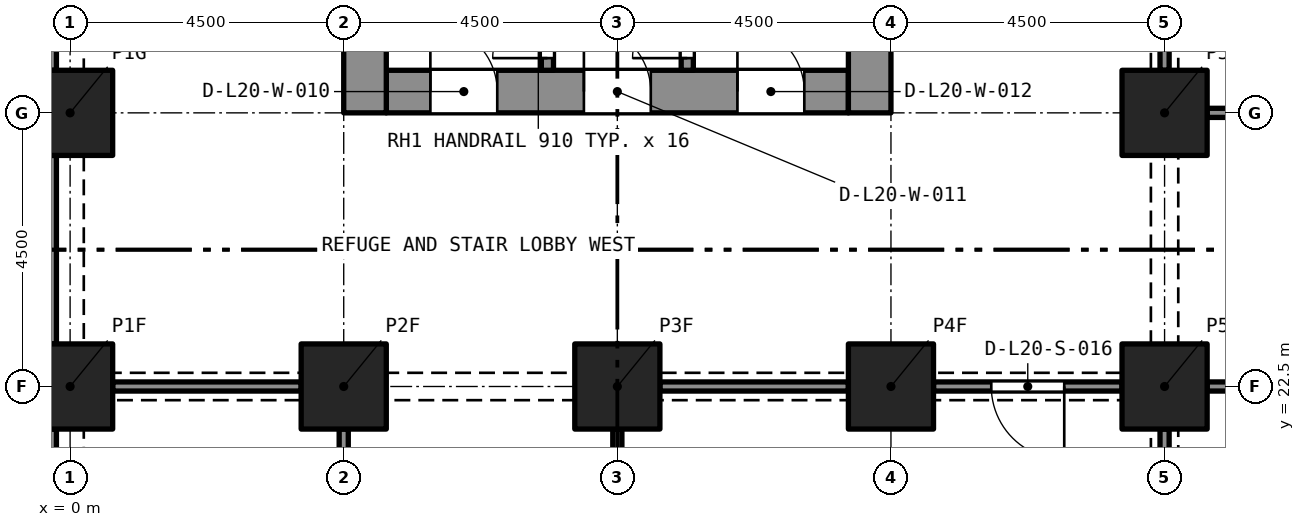
"""IFC4 building model, lengths in metres.
Left out: names, types, materials, properties, quantities, classifications, styles, units other than length and angle.
Written with IfcOpenShell. Run it as: python <this file> out.ifc"""

import sys

from ifc_helpers import new_model, si_unit, direction, frame, frame_2d, origin, origin_2d, place, context, subcontext, project, spatial, rectangle, extrude, element, fill, save


model = new_model("IFC4")
c1 = context("Model", 3, precision=1e-05, world=origin(), true_north=direction((0.0, 1.0)))
c2 = subcontext(c1, "Body", "Model", "MODEL_VIEW")
j1 = project(units=[si_unit("LENGTHUNIT", "METRE"), si_unit("PLANEANGLEUNIT", "RADIAN")], contexts=[c1])
p1 = place(None, origin())
s1 = spatial("IfcSite", under=j1, at=p1, CompositionType="ELEMENT")
p2 = place(p1, origin())
s2 = spatial("IfcBuilding", under=s1, at=p2, CompositionType="ELEMENT")
p3 = place(p2, frame((0.0, 0.0, 75.2)))
s3 = spatial("IfcBuildingStorey", under=s2, at=p3, CompositionType="ELEMENT", Elevation=75.2)
for number, where, z_axis, x_axis in (
    (1, (0.0, 22.5, 0.0), (0.0, 0.0, 1.0), (1.0, 0.0, 0.0)),
    (2, (4.5, 22.5, 0.0), (0.0, 0.0, 1.0), (1.0, 0.0, 0.0)),
    (3, (9.0, 22.5, 0.0), (0.0, 0.0, 1.0), (1.0, 0.0, 0.0)),
    (4, (13.5, 22.5, 0.0), (0.0, 0.0, 1.0), (1.0, 0.0, 0.0)),
    (5, (18.0, 22.5, 0.0), (0.0, 0.0, 1.0), (1.0, 0.0, 0.0)),
    (6, (0.0, 27.0, 0.0), (0.0, 0.0, 1.0), (1.0, 0.0, 0.0)),
    (7, (18.0, 27.0, 0.0), (0.0, 0.0, 1.0), (1.0, 0.0, 0.0)),
):
    element("IfcColumn", number, at=place(p3, frame(where, z_axis=z_axis, x_axis=x_axis)), inside=s3, PredefinedType="COLUMN", context=c2, shape_type="SweptSolid", body=[
        extrude(rectangle(XDim=1.4, YDim=1.4, at=origin_2d()), origin(), (0.0, 0.0, 1.0), 4.8),
    ])
p4 = place(p3, frame((5.2, 27.35, 0.0), z_axis=(0.0, 0.0, 1.0), x_axis=(1.0, 0.0, 0.0)))
e8 = element("IfcWall", 8, at=p4, inside=s3, PredefinedType="SOLIDWALL", context=c2, shape_type="SweptSolid", body=[
    extrude(rectangle(XDim=7.6, YDim=0.7, at=frame_2d((3.8, 0.0))), origin(), (0.0, 0.0, 1.0), 4.8),
])
p5 = place(p4, frame((0.725, 0.0, 0.0)))
e9 = element("IfcOpeningElement", 9, at=p5, cuts=e8, PredefinedType="OPENING", context=c2, shape_type="SweptSolid", body=[
    extrude(rectangle(XDim=1.1, YDim=2.1, at=frame_2d((0.55, 1.05))), frame((0.0, 0.36, 0.0), z_axis=(0.0, -1.0, 0.0), x_axis=(1.0, 0.0, 0.0)), (0.0, 0.0, 1.0), 0.72),
])
p6 = place(p4, frame((3.25, 0.0, 0.0)))
e10 = element("IfcOpeningElement", 10, at=p6, cuts=e8, PredefinedType="OPENING", context=c2, shape_type="SweptSolid", body=[
    extrude(rectangle(XDim=1.1, YDim=2.1, at=frame_2d((0.55, 1.05))), frame((0.0, 0.36, 0.0), z_axis=(0.0, -1.0, 0.0), x_axis=(1.0, 0.0, 0.0)), (0.0, 0.0, 1.0), 0.72),
])
p7 = place(p4, frame((5.775, 0.0, 0.0)))
e11 = element("IfcOpeningElement", 11, at=p7, cuts=e8, PredefinedType="OPENING", context=c2, shape_type="SweptSolid", body=[
    extrude(rectangle(XDim=1.1, YDim=2.1, at=frame_2d((0.55, 1.05))), frame((0.0, 0.36, 0.0), z_axis=(0.0, -1.0, 0.0), x_axis=(1.0, 0.0, 0.0)), (0.0, 0.0, 1.0), 0.72),
])
p8 = place(p3, frame((4.85, 27.0, 0.0), z_axis=(0.0, 0.0, 1.0), x_axis=(0.0, 1.0, 0.0)))
e12 = element("IfcWall", 12, at=p8, inside=s3, PredefinedType="SOLIDWALL", context=c2, shape_type="SweptSolid", body=[
    extrude(rectangle(XDim=13.5, YDim=0.7, at=frame_2d((6.75, 0.0))), origin(), (0.0, 0.0, 1.0), 4.8),
])
p9 = place(p8, frame((8.95, 0.0, 0.0)))
e13 = element("IfcOpeningElement", 13, at=p9, cuts=e12, PredefinedType="OPENING", context=c2, shape_type="SweptSolid", body=[
    extrude(rectangle(XDim=1.2, YDim=2.1, at=frame_2d((0.6, 1.05))), frame((0.0, 0.36, 0.0), z_axis=(0.0, -1.0, 0.0), x_axis=(1.0, 0.0, 0.0)), (0.0, 0.0, 1.0), 0.72),
])
p10 = place(p3, frame((13.15, 27.0, 0.0), z_axis=(0.0, 0.0, 1.0), x_axis=(0.0, 1.0, 0.0)))
e14 = element("IfcWall", 14, at=p10, inside=s3, PredefinedType="SOLIDWALL", context=c2, shape_type="SweptSolid", body=[
    extrude(rectangle(XDim=13.5, YDim=0.7, at=frame_2d((6.75, 0.0))), origin(), (0.0, 0.0, 1.0), 4.8),
])
p11 = place(p10, frame((11.1, 0.0, 0.0)))
e15 = element("IfcOpeningElement", 15, at=p11, cuts=e14, PredefinedType="OPENING", context=c2, shape_type="SweptSolid", body=[
    extrude(rectangle(XDim=1.1, YDim=2.1, at=frame_2d((0.55, 1.05))), frame((0.0, 0.36, 0.0), z_axis=(0.0, -1.0, 0.0), x_axis=(1.0, 0.0, 0.0)), (0.0, 0.0, 1.0), 0.72),
])
p12 = place(p10, frame((8.95, 0.0, 0.0)))
e16 = element("IfcOpeningElement", 16, at=p12, cuts=e14, PredefinedType="OPENING", context=c2, shape_type="SweptSolid", body=[
    extrude(rectangle(XDim=1.2, YDim=2.1, at=frame_2d((0.6, 1.05))), frame((0.0, 0.36, 0.0), z_axis=(0.0, -1.0, 0.0), x_axis=(1.0, 0.0, 0.0)), (0.0, 0.0, 1.0), 0.72),
])
for number, where, z_axis, x_axis in (
    (17, (-0.375, 27.7, 0.0), (0.0, 0.0, 1.0), (0.0, 1.0, 0.0)),
    (18, (-0.375, 23.2, 0.0), (0.0, 0.0, 1.0), (0.0, 1.0, 0.0)),
    (19, (-0.375, 18.7, 0.0), (0.0, 0.0, 1.0), (0.0, 1.0, 0.0)),
):
    element("IfcWall", number, at=place(p3, frame(where, z_axis=z_axis, x_axis=x_axis)), inside=s3, PredefinedType="SOLIDWALL", context=c2, shape_type="SweptSolid", body=[
        extrude(rectangle(XDim=3.1, YDim=0.3, at=frame_2d((1.55, 0.0))), origin(), (0.0, 0.0, 1.0), 4.8),
    ])
p13 = place(p3, frame((7.85, 27.7, 0.0), z_axis=(0.0, 0.0, 1.0), x_axis=(0.0, 1.0, 0.0)))
e20 = element("IfcWall", 20, at=p13, inside=s3, PredefinedType="SOLIDWALL", context=c2, shape_type="SweptSolid", body=[
    extrude(rectangle(XDim=5.4, YDim=0.2, at=frame_2d((2.7, 0.0))), origin(), (0.0, 0.0, 1.0), 4.5),
])
p14 = place(p13, frame((0.2, 0.0, 0.0)))
e21 = element("IfcOpeningElement", 21, at=p14, cuts=e20, PredefinedType="OPENING", context=c2, shape_type="SweptSolid", body=[
    extrude(rectangle(XDim=0.9, YDim=2.1, at=frame_2d((0.45, 1.05))), frame((0.0, 0.11, 0.0), z_axis=(0.0, -1.0, 0.0), x_axis=(1.0, 0.0, 0.0)), (0.0, 0.0, 1.0), 0.22),
])
p15 = place(p3, frame((10.15, 27.7, 0.0), z_axis=(0.0, 0.0, 1.0), x_axis=(0.0, 1.0, 0.0)))
e22 = element("IfcWall", 22, at=p15, inside=s3, PredefinedType="SOLIDWALL", context=c2, shape_type="SweptSolid", body=[
    extrude(rectangle(XDim=5.4, YDim=0.2, at=frame_2d((2.7, 0.0))), origin(), (0.0, 0.0, 1.0), 4.5),
])
p16 = place(p15, frame((0.2, 0.0, 0.0)))
e23 = element("IfcOpeningElement", 23, at=p16, cuts=e22, PredefinedType="OPENING", context=c2, shape_type="SweptSolid", body=[
    extrude(rectangle(XDim=0.9, YDim=2.1, at=frame_2d((0.45, 1.05))), frame((0.0, 0.11, 0.0), z_axis=(0.0, -1.0, 0.0), x_axis=(1.0, 0.0, 0.0)), (0.0, 0.0, 1.0), 0.22),
])
p17 = place(p3, frame((18.7, 27.0, 0.0), z_axis=(0.0, 0.0, 1.0), x_axis=(1.0, 0.0, 0.0)))
e24 = element("IfcWall", 24, at=p17, inside=s3, PredefinedType="PARTITIONING", context=c2, shape_type="SweptSolid", body=[
    extrude(rectangle(XDim=12.1, YDim=0.15, at=frame_2d((6.05, 0.0))), origin(), (0.0, 0.0, 1.0), 4.35),
])
p18 = place(p17, frame((5.3, 0.0, 0.0)))
e25 = element("IfcOpeningElement", 25, at=p18, cuts=e24, PredefinedType="OPENING", context=c2, shape_type="SweptSolid", body=[
    extrude(rectangle(XDim=1.5, YDim=2.4, at=frame_2d((0.75, 1.2))), frame((0.0, 0.085, 0.0), z_axis=(0.0, -1.0, 0.0), x_axis=(1.0, 0.0, 0.0)), (0.0, 0.0, 1.0), 0.17),
])
p19 = place(p3, frame((30.8, 22.5, 0.0), z_axis=(0.0, 0.0, 1.0), x_axis=(-1.0, 0.0, 0.0)))
e26 = element("IfcWall", 26, at=p19, inside=s3, PredefinedType="PARTITIONING", context=c2, shape_type="SweptSolid", body=[
    extrude(rectangle(XDim=12.1, YDim=0.15, at=frame_2d((6.05, 0.0))), origin(), (0.0, 0.0, 1.0), 4.35),
])
p20 = place(p19, frame((5.3, 0.0, 0.0)))
e27 = element("IfcOpeningElement", 27, at=p20, cuts=e26, PredefinedType="OPENING", context=c2, shape_type="SweptSolid", body=[
    extrude(rectangle(XDim=1.5, YDim=2.4, at=frame_2d((0.75, 1.2))), frame((0.0, 0.085, 0.0), z_axis=(0.0, -1.0, 0.0), x_axis=(1.0, 0.0, 0.0)), (0.0, 0.0, 1.0), 0.17),
])
for number, where, z_axis, x_axis in (
    (28, (18.0, 27.7, 0.0), (0.0, 0.0, 1.0), (0.0, 1.0, 0.0)),
    (29, (18.0, 18.7, 0.0), (0.0, 0.0, 1.0), (0.0, 1.0, 0.0)),
):
    element("IfcWall", number, at=place(p3, frame(where, z_axis=z_axis, x_axis=x_axis)), inside=s3, PredefinedType="PARTITIONING", context=c2, shape_type="SweptSolid", body=[
        extrude(rectangle(XDim=3.1, YDim=0.15, at=frame_2d((1.55, 0.0))), origin(), (0.0, 0.0, 1.0), 3.98),
    ])
p21 = place(p3, frame((17.3, 22.5, 0.0), z_axis=(0.0, 0.0, 1.0), x_axis=(-1.0, 0.0, 0.0)))
e30 = element("IfcWall", 30, at=p21, inside=s3, PredefinedType="PARTITIONING", context=c2, shape_type="SweptSolid", body=[
    extrude(rectangle(XDim=3.1, YDim=0.15, at=frame_2d((1.55, 0.0))), origin(), (0.0, 0.0, 1.0), 3.98),
])
p22 = place(p21, frame((0.95, 0.0, 0.0)))
e31 = element("IfcOpeningElement", 31, at=p22, cuts=e30, PredefinedType="OPENING", context=c2, shape_type="SweptSolid", body=[
    extrude(rectangle(XDim=1.2, YDim=2.1, at=frame_2d((0.6, 1.05))), frame((0.0, 0.085, 0.0), z_axis=(0.0, -1.0, 0.0), x_axis=(1.0, 0.0, 0.0)), (0.0, 0.0, 1.0), 0.17),
])
for number, where, z_axis, x_axis in (
    (32, (9.7, 22.5, 0.0), (0.0, 0.0, 1.0), (1.0, 0.0, 0.0)),
    (33, (0.7, 22.5, 0.0), (0.0, 0.0, 1.0), (1.0, 0.0, 0.0)),
):
    element("IfcWall", number, at=place(p3, frame(where, z_axis=z_axis, x_axis=x_axis)), inside=s3, PredefinedType="PARTITIONING", context=c2, shape_type="SweptSolid", body=[
        extrude(rectangle(XDim=3.1, YDim=0.15, at=frame_2d((1.55, 0.0))), origin(), (0.0, 0.0, 1.0), 3.98),
    ])
p23 = place(p3, frame((9.0, 13.5, 0.0), z_axis=(0.0, 0.0, 1.0), x_axis=(0.0, 1.0, 0.0)))
e34 = element("IfcWall", 34, at=p23, inside=s3, PredefinedType="PARTITIONING", context=c2, shape_type="SweptSolid", body=[
    extrude(rectangle(XDim=8.3, YDim=0.15, at=frame_2d((4.15, 0.0))), origin(), (0.0, 0.0, 1.0), 4.5),
])
p24 = place(p3, frame((4.5, 13.5, 0.0), z_axis=(0.0, 0.0, 1.0), x_axis=(0.0, 1.0, 0.0)))
e35 = element("IfcWall", 35, at=p24, inside=s3, PredefinedType="PARTITIONING", context=c2, shape_type="SweptSolid", body=[
    extrude(rectangle(XDim=8.3, YDim=0.15, at=frame_2d((4.15, 0.0))), origin(), (0.0, 0.0, 1.0), 4.5),
])
p25 = place(p24, frame((3.65, 0.0, 0.0)))
e36 = element("IfcOpeningElement", 36, at=p25, cuts=e35, PredefinedType="OPENING", context=c2, shape_type="SweptSolid", body=[
    extrude(rectangle(XDim=1.0, YDim=2.1, at=frame_2d((0.5, 1.05))), frame((0.0, 0.085, 0.0), z_axis=(0.0, -1.0, 0.0), x_axis=(1.0, 0.0, 0.0)), (0.0, 0.0, 1.0), 0.17),
])
p26 = place(p14, origin())
e37 = element("IfcDoor", 37, at=p26, inside=s3, OperationType="SINGLE_SWING_LEFT", PredefinedType="DOOR", context=c2, shape_type="SweptSolid", body=[
    extrude(rectangle(XDim=0.9, YDim=2.1, at=frame_2d((0.45, 1.05))), frame((0.0, 0.025, 0.0), z_axis=(0.0, -1.0, 0.0), x_axis=(1.0, 0.0, 0.0)), (0.0, 0.0, 1.0), 0.05),
])
fill(e21, e37)
p27 = place(p16, origin())
e38 = element("IfcDoor", 38, at=p27, inside=s3, OperationType="SINGLE_SWING_LEFT", PredefinedType="DOOR", context=c2, shape_type="SweptSolid", body=[
    extrude(rectangle(XDim=0.9, YDim=2.1, at=frame_2d((0.45, 1.05))), frame((0.0, 0.025, 0.0), z_axis=(0.0, -1.0, 0.0), x_axis=(1.0, 0.0, 0.0)), (0.0, 0.0, 1.0), 0.05),
])
fill(e23, e38)
p28 = place(p5, origin())
e39 = element("IfcDoor", 39, at=p28, inside=s3, OperationType="SINGLE_SWING_LEFT", PredefinedType="DOOR", context=c2, shape_type="SweptSolid", body=[
    extrude(rectangle(XDim=1.1, YDim=2.1, at=frame_2d((0.55, 1.05))), frame((0.0, 0.025, 0.0), z_axis=(0.0, -1.0, 0.0), x_axis=(1.0, 0.0, 0.0)), (0.0, 0.0, 1.0), 0.05),
])
fill(e9, e39)
p29 = place(p6, origin())
e40 = element("IfcDoor", 40, at=p29, inside=s3, OperationType="SINGLE_SWING_LEFT", PredefinedType="DOOR", context=c2, shape_type="SweptSolid", body=[
    extrude(rectangle(XDim=1.1, YDim=2.1, at=frame_2d((0.55, 1.05))), frame((0.0, 0.025, 0.0), z_axis=(0.0, -1.0, 0.0), x_axis=(1.0, 0.0, 0.0)), (0.0, 0.0, 1.0), 0.05),
])
fill(e10, e40)
p30 = place(p7, origin())
e41 = element("IfcDoor", 41, at=p30, inside=s3, OperationType="SINGLE_SWING_LEFT", PredefinedType="DOOR", context=c2, shape_type="SweptSolid", body=[
    extrude(rectangle(XDim=1.1, YDim=2.1, at=frame_2d((0.55, 1.05))), frame((0.0, 0.025, 0.0), z_axis=(0.0, -1.0, 0.0), x_axis=(1.0, 0.0, 0.0)), (0.0, 0.0, 1.0), 0.05),
])
fill(e11, e41)
p31 = place(p22, origin())
e42 = element("IfcDoor", 42, at=p31, inside=s3, OperationType="SINGLE_SWING_LEFT", PredefinedType="DOOR", context=c2, shape_type="SweptSolid", body=[
    extrude(rectangle(XDim=1.2, YDim=2.1, at=frame_2d((0.6, 1.05))), frame((0.0, 0.025, 0.0), z_axis=(0.0, -1.0, 0.0), x_axis=(1.0, 0.0, 0.0)), (0.0, 0.0, 1.0), 0.05),
])
fill(e31, e42)
save(model, sys.argv[1])
